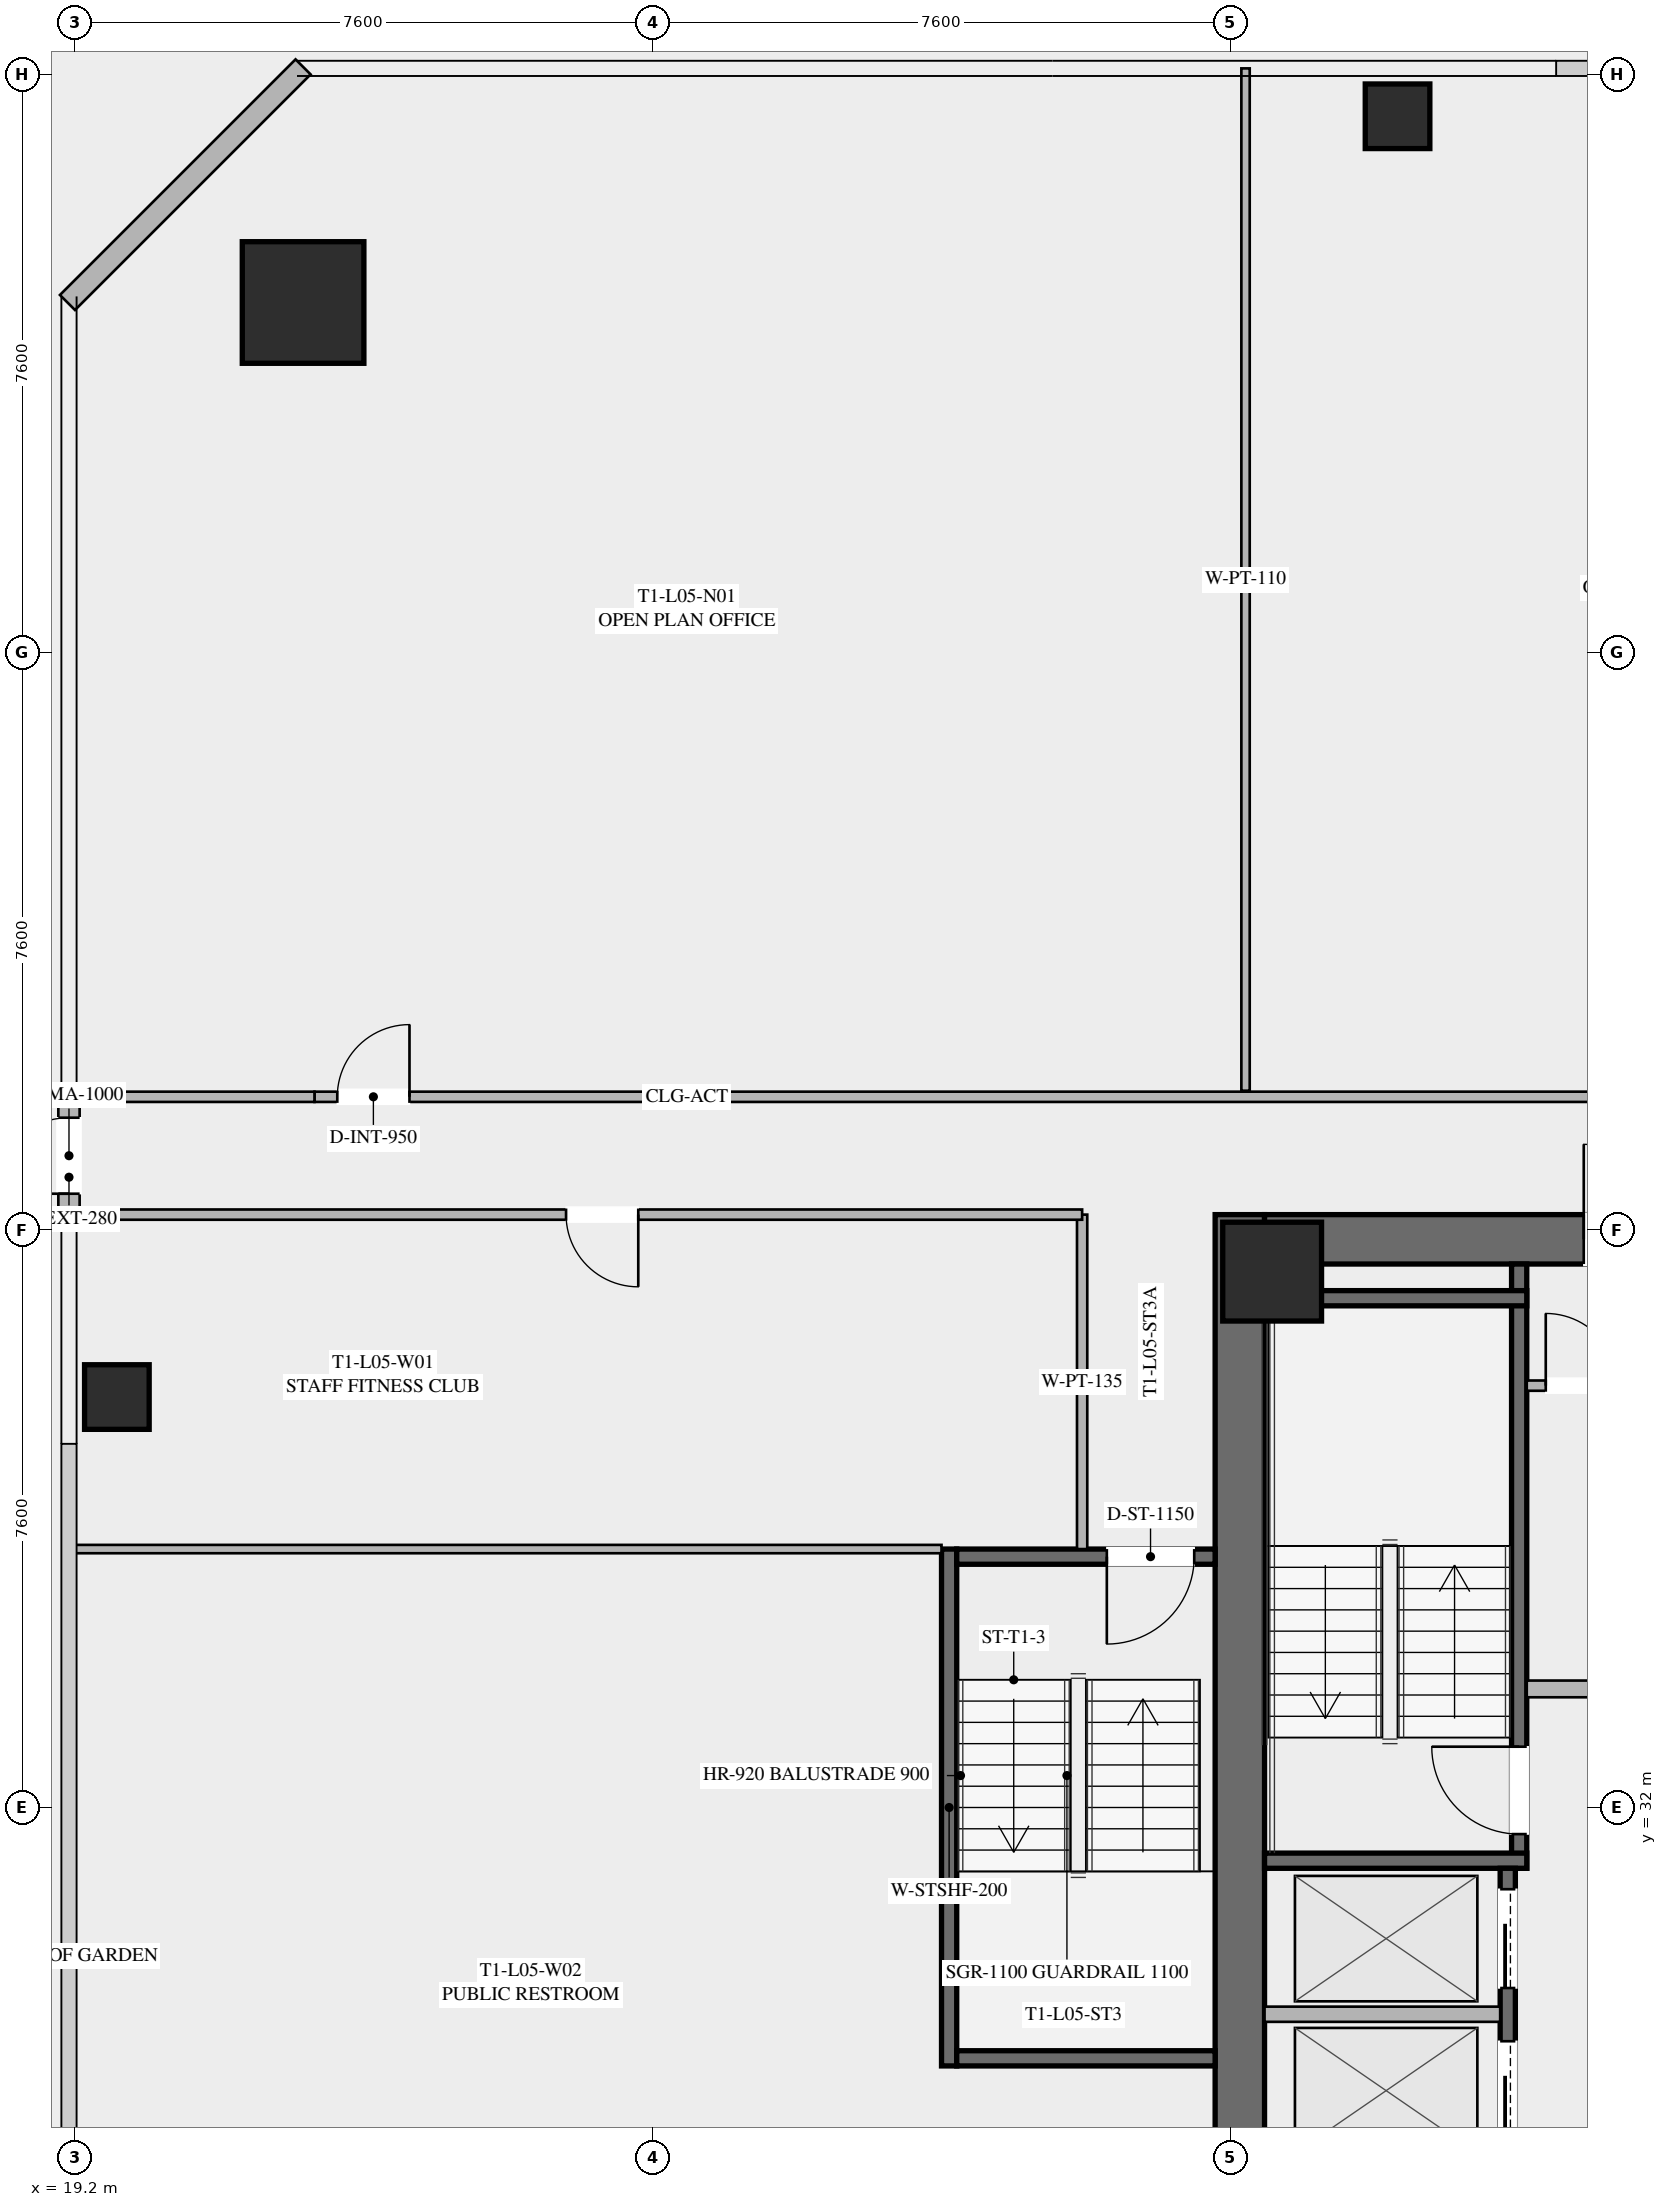
"""IFC4 building model, lengths in metres.
Left out: names, types, materials, properties, quantities, classifications, styles, units other than length and angle.
Written with IfcOpenShell. Run it as: python <this file> out.ifc"""

import sys

from ifc_helpers import new_model, si_unit, direction, frame, frame_2d, origin, origin_2d, place, context, subcontext, project, spatial, rectangle, hollow_rectangle, extrude, element, fill, save


model = new_model("IFC4")
c1 = context("Model", 3, precision=1e-05, world=origin(), true_north=direction((0.0, 1.0)))
c2 = subcontext(c1, "Body", "Model", "MODEL_VIEW")
j1 = project(units=[si_unit("LENGTHUNIT", "METRE"), si_unit("PLANEANGLEUNIT", "RADIAN")], contexts=[c1])
p1 = place(None, origin())
s1 = spatial("IfcSite", under=j1, at=p1, CompositionType="ELEMENT")
p2 = place(p1, origin())
s2 = spatial("IfcBuilding", under=s1, at=p2, CompositionType="ELEMENT")
p3 = place(p2, frame((0.0, 0.0, 24.6)))
s3 = spatial("IfcBuildingStorey", under=s2, at=p3, CompositionType="ELEMENT", Elevation=24.6)
p4 = place(p3, frame((34.525, 24.2, 0.0), z_axis=(0.0, 0.0, 1.0), x_axis=(0.0, 1.0, 0.0)))
e1 = element("IfcWall", 1, at=p4, inside=s3, PredefinedType="SHEAR", context=c2, shape_type="SweptSolid", body=[
    extrude(rectangle(XDim=15.6, YDim=0.65, at=frame_2d((7.8, 0.0))), origin(), (0.0, 0.0, 1.0), 3.55),
])
p5 = place(p3, frame((34.85, 39.475, 0.0), z_axis=(0.0, 0.0, 1.0), x_axis=(1.0, 0.0, 0.0)))
e2 = element("IfcWall", 2, at=p5, inside=s3, PredefinedType="SHEAR", context=c2, shape_type="SweptSolid", body=[
    extrude(rectangle(XDim=14.3, YDim=0.65, at=frame_2d((7.15, 0.0))), origin(), (0.0, 0.0, 1.0), 3.55),
])
p6 = place(p5, frame((4.2, 0.0, 0.0)))
e3 = element("IfcOpeningElement", 3, at=p6, cuts=e2, PredefinedType="OPENING", context=c2, shape_type="SweptSolid", body=[
    extrude(rectangle(XDim=1.25, YDim=2.25, at=frame_2d((0.625, 1.125))), frame((0.0, 0.335, 0.0), z_axis=(0.0, -1.0, 0.0), x_axis=(1.0, 0.0, 0.0)), (0.0, 0.0, 1.0), 0.67),
])
p7 = place(p5, frame((9.25, 0.0, 0.0)))
e4 = element("IfcOpeningElement", 4, at=p7, cuts=e2, PredefinedType="OPENING", context=c2, shape_type="SweptSolid", body=[
    extrude(rectangle(XDim=1.25, YDim=2.25, at=frame_2d((0.625, 1.125))), frame((0.0, 0.335, 0.0), z_axis=(0.0, -1.0, 0.0), x_axis=(1.0, 0.0, 0.0)), (0.0, 0.0, 1.0), 0.67),
])
p8 = place(p3, frame((34.95, 39.05, 0.0), z_axis=(0.0, 0.0, 1.0), x_axis=(1.0, 0.0, 0.0)))
e5 = element("IfcColumn", 5, at=p8, inside=s3, PredefinedType="COLUMN", context=c2, shape_type="SweptSolid", body=[
    extrude(hollow_rectangle(XDim=1.3, YDim=1.3, WallThickness=0.05, at=origin_2d()), origin(), (0.0, 0.0, 1.0), 3.35),
])
p9 = place(p3, frame((22.2, 51.8, 0.0), z_axis=(0.0, 0.0, 1.0), x_axis=(1.0, 0.0, 0.0)))
e6 = element("IfcColumn", 6, at=p9, inside=s3, PredefinedType="COLUMN", context=c2, shape_type="SweptSolid", body=[
    extrude(hollow_rectangle(XDim=1.6, YDim=1.6, WallThickness=0.06, at=origin_2d()), origin(), (0.0, 0.0, 1.0), 3.35),
])
for number, where, z_axis, x_axis in (
    (7, (36.6, 54.25, 0.0), (0.0, 0.0, 1.0), (1.0, 0.0, 0.0)),
    (8, (19.75, 37.4, 0.0), (0.0, 0.0, 1.0), (1.0, 0.0, 0.0)),
):
    element("IfcColumn", number, at=place(p3, frame(where, z_axis=z_axis, x_axis=x_axis)), inside=s3, PredefinedType="COLUMN", context=c2, shape_type="SweptSolid", body=[
        extrude(hollow_rectangle(XDim=0.85, YDim=0.85, WallThickness=0.035, at=origin_2d()), origin(), (0.0, 0.0, 1.0), 3.35),
    ])
p10 = place(p3, frame((19.12, 39.867, 0.0), z_axis=(0.0, 0.0, 1.0), x_axis=(0.0, 1.0, 0.0)))
e9 = element("IfcWall", 9, at=p10, inside=s3, PredefinedType="SOLIDWALL", context=c2, shape_type="SweptSolid", body=[
    extrude(rectangle(XDim=1.415, YDim=0.28, at=frame_2d((0.708, 0.0))), origin(), (0.0, 0.0, 1.0), 3.35),
])
p11 = place(p10, frame((0.208, 0.0, 0.0)))
e10 = element("IfcOpeningElement", 10, at=p11, cuts=e9, PredefinedType="OPENING", context=c2, shape_type="SweptSolid", body=[
    extrude(rectangle(XDim=1.0, YDim=2.15, at=frame_2d((0.5, 1.075))), frame((0.0, 0.15, 0.0), z_axis=(0.0, -1.0, 0.0), x_axis=(1.0, 0.0, 0.0)), (0.0, 0.0, 1.0), 0.3),
])
p12 = place(p3, frame((19.1, 51.8, 0.0), z_axis=(0.0, 0.0, 1.0), x_axis=(0.707106781187, 0.707106781187, 0.0)))
e11 = element("IfcWall", 11, at=p12, inside=s3, PredefinedType="SOLIDWALL", context=c2, shape_type="SweptSolid", body=[
    extrude(rectangle(XDim=4.384, YDim=0.28, at=frame_2d((2.192, 0.0))), origin(), (0.0, 0.0, 1.0), 3.35),
])
p13 = place(p3, frame((38.2, 31.2, 0.0), z_axis=(0.0, 0.0, 1.0), x_axis=(0.0, 1.0, 0.0)))
e12 = element("IfcWall", 12, at=p13, inside=s3, PredefinedType="SHEAR", context=c2, shape_type="SweptSolid", body=[
    extrude(rectangle(XDim=7.95, YDim=0.2, at=frame_2d((3.975, 0.0))), origin(), (0.0, 0.0, 1.0), 3.35),
])
p14 = place(p13, frame((0.45, 0.0, 0.0)))
e13 = element("IfcOpeningElement", 13, at=p14, cuts=e12, PredefinedType="OPENING", context=c2, shape_type="SweptSolid", body=[
    extrude(rectangle(XDim=1.15, YDim=2.2, at=frame_2d((0.575, 1.1))), frame((0.0, 0.11, 0.0), z_axis=(0.0, -1.0, 0.0), x_axis=(1.0, 0.0, 0.0)), (0.0, 0.0, 1.0), 0.22),
])
for number, where, z_axis, x_axis in (
    (14, (34.85, 31.3, 0.0), (0.0, 0.0, 1.0), (1.0, 0.0, 0.0)),
    (15, (34.85, 38.7, 0.0), (0.0, 0.0, 1.0), (1.0, 0.0, 0.0)),
):
    element("IfcWall", number, at=place(p3, frame(where, z_axis=z_axis, x_axis=x_axis)), inside=s3, PredefinedType="SHEAR", context=c2, shape_type="SweptSolid", body=[
        extrude(rectangle(XDim=3.45, YDim=0.2, at=frame_2d((1.725, 0.0))), origin(), (0.0, 0.0, 1.0), 3.35),
    ])
p15 = place(p3, frame((38.3, 33.56, 0.0), z_axis=(0.0, 0.0, 1.0), x_axis=(1.0, 0.0, 0.0)))
e16 = element("IfcWall", 16, at=p15, inside=s3, PredefinedType="SOLIDWALL", context=c2, shape_type="SweptSolid", body=[
    extrude(rectangle(XDim=3.15, YDim=0.22, at=frame_2d((1.575, 0.0))), origin(), (0.0, 0.0, 1.0), 2.703),
])
p16 = place(p3, frame((38.05, 24.85, 0.0), z_axis=(0.0, 0.0, 1.0), x_axis=(0.0, 1.0, 0.0)))
e17 = element("IfcWall", 17, at=p16, inside=s3, PredefinedType="SHEAR", context=c2, shape_type="SweptSolid", body=[
    extrude(rectangle(XDim=6.35, YDim=0.2, at=frame_2d((3.175, 0.0))), origin(), (0.0, 0.0, 1.0), 3.35),
])
p17 = place(p16, frame((4.775, 0.0, 0.0)))
e18 = element("IfcOpeningElement", 18, at=p17, cuts=e17, PredefinedType="OPENING", context=c2, shape_type="SweptSolid", body=[
    extrude(rectangle(XDim=1.3, YDim=2.25, at=frame_2d((0.65, 1.125))), frame((0.0, 0.11, 0.0), z_axis=(0.0, -1.0, 0.0), x_axis=(1.0, 0.0, 0.0)), (0.0, 0.0, 1.0), 0.22),
])
p18 = place(p16, frame((2.775, 0.0, 0.0)))
e19 = element("IfcOpeningElement", 19, at=p18, cuts=e17, PredefinedType="OPENING", context=c2, shape_type="SweptSolid", body=[
    extrude(rectangle(XDim=1.3, YDim=2.25, at=frame_2d((0.65, 1.125))), frame((0.0, 0.11, 0.0), z_axis=(0.0, -1.0, 0.0), x_axis=(1.0, 0.0, 0.0)), (0.0, 0.0, 1.0), 0.22),
])
p19 = place(p16, frame((0.575, 0.0, 0.0)))
e20 = element("IfcOpeningElement", 20, at=p19, cuts=e17, PredefinedType="OPENING", context=c2, shape_type="SweptSolid", body=[
    extrude(rectangle(XDim=1.3, YDim=2.25, at=frame_2d((0.65, 1.125))), frame((0.0, 0.11, 0.0), z_axis=(0.0, -1.0, 0.0), x_axis=(1.0, 0.0, 0.0)), (0.0, 0.0, 1.0), 0.22),
])
p20 = place(p3, frame((34.85, 29.28, 0.0), z_axis=(0.0, 0.0, 1.0), x_axis=(1.0, 0.0, 0.0)))
e21 = element("IfcWall", 21, at=p20, inside=s3, PredefinedType="SOLIDWALL", context=c2, shape_type="SweptSolid", body=[
    extrude(rectangle(XDim=3.1, YDim=0.2, at=frame_2d((1.55, 0.0))), origin(), (0.0, 0.0, 1.0), 3.35),
])
p21 = place(p3, frame((38.3, 37.55, 0.0), z_axis=(0.0, 0.0, 1.0), x_axis=(1.0, 0.0, 0.0)))
e22 = element("IfcWall", 22, at=p21, inside=s3, PredefinedType="PARTITIONING", context=c2, shape_type="SweptSolid", body=[
    extrude(rectangle(XDim=3.15, YDim=0.135, at=frame_2d((1.575, 0.0))), origin(), (0.0, 0.0, 1.0), 2.703),
])
p22 = place(p21, frame((0.25, 0.0, 0.0)))
e23 = element("IfcOpeningElement", 23, at=p22, cuts=e22, PredefinedType="OPENING", context=c2, shape_type="SweptSolid", body=[
    extrude(rectangle(XDim=0.95, YDim=2.05, at=frame_2d((0.475, 1.025))), frame((0.0, 0.077, 0.0), z_axis=(0.0, -1.0, 0.0), x_axis=(1.0, 0.0, 0.0)), (0.0, 0.0, 1.0), 0.155),
])
p23 = place(p21, frame((1.95, 0.0, 0.0)))
e24 = element("IfcOpeningElement", 24, at=p23, cuts=e22, PredefinedType="OPENING", context=c2, shape_type="SweptSolid", body=[
    extrude(rectangle(XDim=0.95, YDim=2.05, at=frame_2d((0.475, 1.025))), frame((0.0, 0.077, 0.0), z_axis=(0.0, -1.0, 0.0), x_axis=(1.0, 0.0, 0.0)), (0.0, 0.0, 1.0), 0.155),
])
p24 = place(p3, frame((30.7, 28.6, 0.0), z_axis=(0.0, 0.0, 1.0), x_axis=(0.0, 1.0, 0.0)))
e25 = element("IfcWall", 25, at=p24, inside=s3, PredefinedType="SHEAR", context=c2, shape_type="SweptSolid", body=[
    extrude(rectangle(XDim=6.8, YDim=0.2, at=frame_2d((3.4, 0.0))), origin(), (0.0, 0.0, 1.0), 3.35),
])
p25 = place(p3, frame((34.2, 35.3, 0.0), z_axis=(0.0, 0.0, 1.0), x_axis=(-1.0, 0.0, 0.0)))
e26 = element("IfcWall", 26, at=p25, inside=s3, PredefinedType="SHEAR", context=c2, shape_type="SweptSolid", body=[
    extrude(rectangle(XDim=3.4, YDim=0.2, at=frame_2d((1.7, 0.0))), origin(), (0.0, 0.0, 1.0), 3.35),
])
p26 = place(p25, frame((0.275, 0.0, 0.0)))
e27 = element("IfcOpeningElement", 27, at=p26, cuts=e26, PredefinedType="OPENING", context=c2, shape_type="SweptSolid", body=[
    extrude(rectangle(XDim=1.15, YDim=2.2, at=frame_2d((0.575, 1.1))), frame((0.0, 0.11, 0.0), z_axis=(0.0, -1.0, 0.0), x_axis=(1.0, 0.0, 0.0)), (0.0, 0.0, 1.0), 0.22),
])
p27 = place(p3, frame((30.8, 28.7, 0.0), z_axis=(0.0, 0.0, 1.0), x_axis=(1.0, 0.0, 0.0)))
e28 = element("IfcWall", 28, at=p27, inside=s3, PredefinedType="SHEAR", context=c2, shape_type="SweptSolid", body=[
    extrude(rectangle(XDim=3.4, YDim=0.2, at=frame_2d((1.7, 0.0))), origin(), (0.0, 0.0, 1.0), 3.35),
])
p28 = place(p3, frame((32.45, 35.4, 0.0), z_axis=(0.0, 0.0, 1.0), x_axis=(0.0, 1.0, 0.0)))
e29 = element("IfcWall", 29, at=p28, inside=s3, PredefinedType="PARTITIONING", context=c2, shape_type="SweptSolid", body=[
    extrude(rectangle(XDim=4.4, YDim=0.135, at=frame_2d((2.2, 0.0))), origin(), (0.0, 0.0, 1.0), 2.703),
])
p29 = place(p3, frame((22.35, 41.35, 0.0), z_axis=(0.0, 0.0, 1.0), x_axis=(1.0, 0.0, 0.0)))
e30 = element("IfcWall", 30, at=p29, inside=s3, PredefinedType="PARTITIONING", context=c2, shape_type="SweptSolid", body=[
    extrude(rectangle(XDim=29.0, YDim=0.135, at=frame_2d((14.5, 0.0))), origin(), (0.0, 0.0, 1.0), 2.703),
])
p30 = place(p29, frame((0.3, 0.0, 0.0)))
e31 = element("IfcOpeningElement", 31, at=p30, cuts=e30, PredefinedType="OPENING", context=c2, shape_type="SweptSolid", body=[
    extrude(rectangle(XDim=0.95, YDim=2.05, at=frame_2d((0.475, 1.025))), frame((0.0, 0.077, 0.0), z_axis=(0.0, -1.0, 0.0), x_axis=(1.0, 0.0, 0.0)), (0.0, 0.0, 1.0), 0.155),
])
p31 = place(p29, frame((19.299, 0.0, 0.0)))
e32 = element("IfcOpeningElement", 32, at=p31, cuts=e30, PredefinedType="OPENING", context=c2, shape_type="SweptSolid", body=[
    extrude(rectangle(XDim=0.95, YDim=2.05, at=frame_2d((0.475, 1.025))), frame((0.0, 0.077, 0.0), z_axis=(0.0, -1.0, 0.0), x_axis=(1.0, 0.0, 0.0)), (0.0, 0.0, 1.0), 0.155),
])
p32 = place(p29, frame((27.75, 0.0, 0.0)))
e33 = element("IfcOpeningElement", 33, at=p32, cuts=e30, PredefinedType="OPENING", context=c2, shape_type="SweptSolid", body=[
    extrude(rectangle(XDim=0.95, YDim=2.05, at=frame_2d((0.475, 1.025))), frame((0.0, 0.077, 0.0), z_axis=(0.0, -1.0, 0.0), x_axis=(1.0, 0.0, 0.0)), (0.0, 0.0, 1.0), 0.155),
])
p33 = place(p3, frame((19.12, 41.35, 0.0), z_axis=(0.0, 0.0, 1.0), x_axis=(1.0, 0.0, 0.0)))
e34 = element("IfcWall", 34, at=p33, inside=s3, PredefinedType="PARTITIONING", context=c2, shape_type="SweptSolid", body=[
    extrude(rectangle(XDim=3.23, YDim=0.135, at=frame_2d((1.615, 0.0))), origin(), (0.0, 0.0, 1.0), 2.703),
])
p34 = place(p3, frame((34.6, 41.43, 0.0), z_axis=(0.0, 0.0, 1.0), x_axis=(0.0, 1.0, 0.0)))
e35 = element("IfcWall", 35, at=p34, inside=s3, PredefinedType="PARTITIONING", context=c2, shape_type="SweptSolid", body=[
    extrude(rectangle(XDim=13.45, YDim=0.11, at=frame_2d((6.725, 0.0))), origin(), (0.0, 0.0, 1.0), 2.703),
])
p35 = place(p3, frame((32.45, 39.8, 0.0), z_axis=(0.0, 0.0, 1.0), x_axis=(-1.0, 0.0, 0.0)))
e36 = element("IfcWall", 36, at=p35, inside=s3, PredefinedType="PARTITIONING", context=c2, shape_type="SweptSolid", body=[
    extrude(rectangle(XDim=13.33, YDim=0.135, at=frame_2d((6.665, 0.0))), origin(), (0.0, 0.0, 1.0), 2.703),
])
p36 = place(p35, frame((5.84, 0.0, 0.0)))
e37 = element("IfcOpeningElement", 37, at=p36, cuts=e36, PredefinedType="OPENING", context=c2, shape_type="SweptSolid", body=[
    extrude(rectangle(XDim=0.95, YDim=2.05, at=frame_2d((0.475, 1.025))), frame((0.0, 0.077, 0.0), z_axis=(0.0, -1.0, 0.0), x_axis=(1.0, 0.0, 0.0)), (0.0, 0.0, 1.0), 0.155),
])
p37 = place(p3, frame((30.6, 35.4, 0.0), z_axis=(0.0, 0.0, 1.0), x_axis=(-1.0, 0.0, 0.0)))
e38 = element("IfcWall", 38, at=p37, inside=s3, PredefinedType="PARTITIONING", context=c2, shape_type="SweptSolid", body=[
    extrude(rectangle(XDim=11.48, YDim=0.11, at=frame_2d((5.74, 0.0))), origin(), (0.0, 0.0, 1.0), 2.703),
])
p38 = place(p11, origin())
e39 = element("IfcDoor", 39, at=p38, inside=s3, OperationType="SINGLE_SWING_LEFT", PredefinedType="DOOR", context=c2, shape_type="SweptSolid", body=[
    extrude(rectangle(XDim=1.0, YDim=2.15, at=frame_2d((0.5, 1.075))), frame((0.0, 0.025, 0.0), z_axis=(0.0, -1.0, 0.0), x_axis=(1.0, 0.0, 0.0)), (0.0, 0.0, 1.0), 0.05),
])
fill(e10, e39)
p39 = place(p6, origin())
e40 = element("IfcDoor", 40, at=p39, inside=s3, OperationType="SINGLE_SWING_LEFT", PredefinedType="DOOR", context=c2, shape_type="SweptSolid", body=[
    extrude(rectangle(XDim=1.25, YDim=2.25, at=frame_2d((0.625, 1.125))), frame((0.0, 0.025, 0.0), z_axis=(0.0, -1.0, 0.0), x_axis=(1.0, 0.0, 0.0)), (0.0, 0.0, 1.0), 0.05),
])
fill(e3, e40)
p40 = place(p14, origin())
e41 = element("IfcDoor", 41, at=p40, inside=s3, OperationType="SINGLE_SWING_RIGHT", PredefinedType="DOOR", context=c2, shape_type="SweptSolid", body=[
    extrude(rectangle(XDim=1.15, YDim=2.2, at=frame_2d((0.575, 1.1))), frame((0.0, 0.025, 0.0), z_axis=(0.0, -1.0, 0.0), x_axis=(1.0, 0.0, 0.0)), (0.0, 0.0, 1.0), 0.05),
])
fill(e13, e41)
p41 = place(p22, origin())
e42 = element("IfcDoor", 42, at=p41, inside=s3, OperationType="SINGLE_SWING_LEFT", PredefinedType="DOOR", context=c2, shape_type="SweptSolid", body=[
    extrude(rectangle(XDim=0.95, YDim=2.05, at=frame_2d((0.475, 1.025))), frame((0.0, 0.025, 0.0), z_axis=(0.0, -1.0, 0.0), x_axis=(1.0, 0.0, 0.0)), (0.0, 0.0, 1.0), 0.05),
])
fill(e23, e42)
p42 = place(p26, origin())
e43 = element("IfcDoor", 43, at=p42, inside=s3, OperationType="SINGLE_SWING_RIGHT", PredefinedType="DOOR", context=c2, shape_type="SweptSolid", body=[
    extrude(rectangle(XDim=1.15, YDim=2.2, at=frame_2d((0.575, 1.1))), frame((0.0, 0.025, 0.0), z_axis=(0.0, -1.0, 0.0), x_axis=(1.0, 0.0, 0.0)), (0.0, 0.0, 1.0), 0.05),
])
fill(e27, e43)
p43 = place(p30, origin())
e44 = element("IfcDoor", 44, at=p43, inside=s3, OperationType="SINGLE_SWING_RIGHT", PredefinedType="DOOR", context=c2, shape_type="SweptSolid", body=[
    extrude(rectangle(XDim=0.95, YDim=2.05, at=frame_2d((0.475, 1.025))), frame((0.0, 0.025, 0.0), z_axis=(0.0, -1.0, 0.0), x_axis=(1.0, 0.0, 0.0)), (0.0, 0.0, 1.0), 0.05),
])
fill(e31, e44)
p44 = place(p36, origin())
e45 = element("IfcDoor", 45, at=p44, inside=s3, OperationType="SINGLE_SWING_LEFT", PredefinedType="DOOR", context=c2, shape_type="SweptSolid", body=[
    extrude(rectangle(XDim=0.95, YDim=2.05, at=frame_2d((0.475, 1.025))), frame((0.0, 0.025, 0.0), z_axis=(0.0, -1.0, 0.0), x_axis=(1.0, 0.0, 0.0)), (0.0, 0.0, 1.0), 0.05),
])
fill(e37, e45)
p45 = place(p17, origin())
e46 = element("IfcDoor", 46, at=p45, inside=s3, OperationType="SLIDING_TO_LEFT", PredefinedType="DOOR", context=c2, shape_type="SweptSolid", body=[
    extrude(rectangle(XDim=1.3, YDim=2.25, at=frame_2d((0.65, 1.125))), frame((0.0, 0.025, 0.0), z_axis=(0.0, -1.0, 0.0), x_axis=(1.0, 0.0, 0.0)), (0.0, 0.0, 1.0), 0.05),
])
fill(e18, e46)
p46 = place(p18, origin())
e47 = element("IfcDoor", 47, at=p46, inside=s3, OperationType="SLIDING_TO_LEFT", PredefinedType="DOOR", context=c2, shape_type="SweptSolid", body=[
    extrude(rectangle(XDim=1.3, YDim=2.25, at=frame_2d((0.65, 1.125))), frame((0.0, 0.025, 0.0), z_axis=(0.0, -1.0, 0.0), x_axis=(1.0, 0.0, 0.0)), (0.0, 0.0, 1.0), 0.05),
])
fill(e19, e47)
save(model, sys.argv[1])
